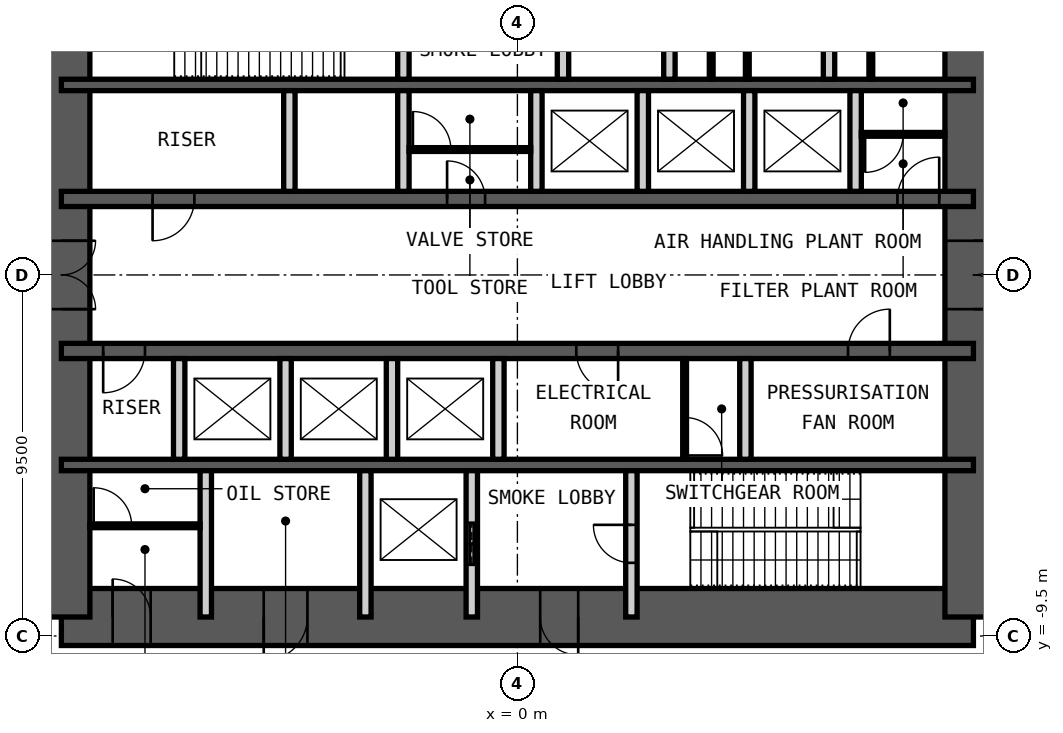
"""IFC4 building model, lengths in metres.
Left out: names, types, materials, properties, quantities, classifications, styles, units other than length and angle.
Written with IfcOpenShell. Run it as: python <this file> out.ifc"""

import sys

from ifc_helpers import new_model, si_unit, direction, frame, frame_2d, origin, place, context, subcontext, project, spatial, rectangle, extrude, element, fill, save


model = new_model("IFC4")
c1 = context("Model", 3, precision=1e-05, world=origin(), true_north=direction((0.0, 1.0)))
c2 = subcontext(c1, "Body", "Model", "MODEL_VIEW")
j1 = project(units=[si_unit("LENGTHUNIT", "METRE"), si_unit("PLANEANGLEUNIT", "RADIAN")], contexts=[c1])
p1 = place(None, origin())
s1 = spatial("IfcSite", under=j1, at=p1, CompositionType="ELEMENT")
p2 = place(p1, origin())
s2 = spatial("IfcBuilding", under=s1, at=p2, CompositionType="ELEMENT")
p3 = place(p2, frame((0.0, 0.0, 97.0)))
s3 = spatial("IfcBuildingStorey", under=s2, at=p3, CompositionType="ELEMENT", Elevation=97.0)
p4 = place(p3, frame((-12.0, -9.0, 0.0), z_axis=(0.0, 0.0, 1.0), x_axis=(1.0, 0.0, 0.0)))
e1 = element("IfcWall", 1, at=p4, inside=s3, PredefinedType="SHEAR", context=c2, shape_type="SweptSolid", body=[
    extrude(rectangle(XDim=24.0, YDim=1.5, at=frame_2d((12.0, 0.0))), origin(), (0.0, 0.0, 1.0), 6.0),
])
p5 = place(p4, frame((1.35, 0.0, 0.0)))
e2 = element("IfcOpeningElement", 2, at=p5, cuts=e1, PredefinedType="OPENING", context=c2, shape_type="SweptSolid", body=[
    extrude(rectangle(XDim=1.0, YDim=2.1, at=frame_2d((0.5, 1.05))), frame((0.0, 0.76, 0.0), z_axis=(0.0, -1.0, 0.0), x_axis=(1.0, 0.0, 0.0)), (0.0, 0.0, 1.0), 1.52),
])
p6 = place(p4, frame((5.325, 0.0, 0.0)))
e3 = element("IfcOpeningElement", 3, at=p6, cuts=e1, PredefinedType="OPENING", context=c2, shape_type="SweptSolid", body=[
    extrude(rectangle(XDim=1.15, YDim=2.1, at=frame_2d((0.575, 1.05))), frame((0.0, 0.76, 0.0), z_axis=(0.0, -1.0, 0.0), x_axis=(1.0, 0.0, 0.0)), (0.0, 0.0, 1.0), 1.52),
])
p7 = place(p4, frame((12.6, 0.0, 0.0)))
e4 = element("IfcOpeningElement", 4, at=p7, cuts=e1, PredefinedType="OPENING", context=c2, shape_type="SweptSolid", body=[
    extrude(rectangle(XDim=1.0, YDim=2.1, at=frame_2d((0.5, 1.05))), frame((0.0, 0.76, 0.0), z_axis=(0.0, -1.0, 0.0), x_axis=(1.0, 0.0, 0.0)), (0.0, 0.0, 1.0), 1.52),
])
p8 = place(p3, frame((12.0, -9.0, 0.0), z_axis=(0.0, 0.0, 1.0), x_axis=(0.0, 1.0, 0.0)))
e5 = element("IfcWall", 5, at=p8, inside=s3, PredefinedType="SHEAR", context=c2, shape_type="SweptSolid", body=[
    extrude(rectangle(XDim=18.0, YDim=1.5, at=frame_2d((9.0, 0.0))), origin(), (0.0, 0.0, 1.0), 6.0),
])
p9 = place(p8, frame((8.1, 0.0, 0.0)))
e6 = element("IfcOpeningElement", 6, at=p9, cuts=e5, PredefinedType="OPENING", context=c2, shape_type="SweptSolid", body=[
    extrude(rectangle(XDim=1.8, YDim=2.1, at=frame_2d((0.9, 1.05))), frame((0.0, 0.76, 0.0), z_axis=(0.0, -1.0, 0.0), x_axis=(1.0, 0.0, 0.0)), (0.0, 0.0, 1.0), 1.52),
])
p10 = place(p3, frame((-12.0, -9.0, 0.0), z_axis=(0.0, 0.0, 1.0), x_axis=(0.0, 1.0, 0.0)))
e7 = element("IfcWall", 7, at=p10, inside=s3, PredefinedType="SHEAR", context=c2, shape_type="SweptSolid", body=[
    extrude(rectangle(XDim=18.0, YDim=1.5, at=frame_2d((9.0, 0.0))), origin(), (0.0, 0.0, 1.0), 6.0),
])
p11 = place(p10, frame((8.1, 0.0, 0.0)))
e8 = element("IfcOpeningElement", 8, at=p11, cuts=e7, PredefinedType="OPENING", context=c2, shape_type="SweptSolid", body=[
    extrude(rectangle(XDim=1.8, YDim=2.1, at=frame_2d((0.9, 1.05))), frame((0.0, 0.76, 0.0), z_axis=(0.0, -1.0, 0.0), x_axis=(1.0, 0.0, 0.0)), (0.0, 0.0, 1.0), 1.52),
])
p12 = place(p3, frame((-12.0, 5.0, 0.0), z_axis=(0.0, 0.0, 1.0), x_axis=(1.0, 0.0, 0.0)))
e9 = element("IfcWall", 9, at=p12, inside=s3, PredefinedType="SHEAR", context=c2, shape_type="SweptSolid", body=[
    extrude(rectangle(XDim=24.0, YDim=0.3, at=frame_2d((12.0, 0.0))), origin(), (0.0, 0.0, 1.0), 6.0),
])
p13 = place(p3, frame((-12.0, 2.0, 0.0), z_axis=(0.0, 0.0, 1.0), x_axis=(1.0, 0.0, 0.0)))
e10 = element("IfcWall", 10, at=p13, inside=s3, PredefinedType="SHEAR", context=c2, shape_type="SweptSolid", body=[
    extrude(rectangle(XDim=24.0, YDim=0.4, at=frame_2d((12.0, 0.0))), origin(), (0.0, 0.0, 1.0), 6.0),
])
p14 = place(p13, frame((2.4, 0.0, 0.0)))
e11 = element("IfcOpeningElement", 11, at=p14, cuts=e10, PredefinedType="OPENING", context=c2, shape_type="SweptSolid", body=[
    extrude(rectangle(XDim=1.1, YDim=2.1, at=frame_2d((0.55, 1.05))), frame((0.0, 0.21, 0.0), z_axis=(0.0, -1.0, 0.0), x_axis=(1.0, 0.0, 0.0)), (0.0, 0.0, 1.0), 0.42),
])
p15 = place(p13, frame((22.0, 0.0, 0.0)))
e12 = element("IfcOpeningElement", 12, at=p15, cuts=e10, PredefinedType="OPENING", context=c2, shape_type="SweptSolid", body=[
    extrude(rectangle(XDim=1.1, YDim=2.1, at=frame_2d((0.55, 1.05))), frame((0.0, 0.21, 0.0), z_axis=(0.0, -1.0, 0.0), x_axis=(1.0, 0.0, 0.0)), (0.0, 0.0, 1.0), 0.42),
])
p16 = place(p13, frame((10.15, 0.0, 0.0)))
e13 = element("IfcOpeningElement", 13, at=p16, cuts=e10, PredefinedType="OPENING", context=c2, shape_type="SweptSolid", body=[
    extrude(rectangle(XDim=1.0, YDim=2.1, at=frame_2d((0.5, 1.05))), frame((0.0, 0.21, 0.0), z_axis=(0.0, -1.0, 0.0), x_axis=(1.0, 0.0, 0.0)), (0.0, 0.0, 1.0), 0.42),
])
p17 = place(p3, frame((-12.0, -2.0, 0.0), z_axis=(0.0, 0.0, 1.0), x_axis=(1.0, 0.0, 0.0)))
e14 = element("IfcWall", 14, at=p17, inside=s3, PredefinedType="SHEAR", context=c2, shape_type="SweptSolid", body=[
    extrude(rectangle(XDim=24.0, YDim=0.4, at=frame_2d((12.0, 0.0))), origin(), (0.0, 0.0, 1.0), 6.0),
])
p18 = place(p17, frame((1.1, 0.0, 0.0)))
e15 = element("IfcOpeningElement", 15, at=p18, cuts=e14, PredefinedType="OPENING", context=c2, shape_type="SweptSolid", body=[
    extrude(rectangle(XDim=1.1, YDim=2.1, at=frame_2d((0.55, 1.05))), frame((0.0, 0.21, 0.0), z_axis=(0.0, -1.0, 0.0), x_axis=(1.0, 0.0, 0.0)), (0.0, 0.0, 1.0), 0.42),
])
p19 = place(p17, frame((13.55, 0.0, 0.0)))
e16 = element("IfcOpeningElement", 16, at=p19, cuts=e14, PredefinedType="OPENING", context=c2, shape_type="SweptSolid", body=[
    extrude(rectangle(XDim=1.1, YDim=2.1, at=frame_2d((0.55, 1.05))), frame((0.0, 0.21, 0.0), z_axis=(0.0, -1.0, 0.0), x_axis=(1.0, 0.0, 0.0)), (0.0, 0.0, 1.0), 0.42),
])
p20 = place(p17, frame((20.7, 0.0, 0.0)))
e17 = element("IfcOpeningElement", 17, at=p20, cuts=e14, PredefinedType="OPENING", context=c2, shape_type="SweptSolid", body=[
    extrude(rectangle(XDim=1.1, YDim=2.1, at=frame_2d((0.55, 1.05))), frame((0.0, 0.21, 0.0), z_axis=(0.0, -1.0, 0.0), x_axis=(1.0, 0.0, 0.0)), (0.0, 0.0, 1.0), 0.42),
])
p21 = place(p3, frame((-12.0, -5.0, 0.0), z_axis=(0.0, 0.0, 1.0), x_axis=(1.0, 0.0, 0.0)))
e18 = element("IfcWall", 18, at=p21, inside=s3, PredefinedType="SHEAR", context=c2, shape_type="SweptSolid", body=[
    extrude(rectangle(XDim=24.0, YDim=0.3, at=frame_2d((12.0, 0.0))), origin(), (0.0, 0.0, 1.0), 6.0),
])
p22 = place(p3, frame((-3.0, 5.15, 0.0), z_axis=(0.0, 0.0, 1.0), x_axis=(0.0, 1.0, 0.0)))
e19 = element("IfcWall", 19, at=p22, inside=s3, PredefinedType="PARTITIONING", context=c2, shape_type="SweptSolid", body=[
    extrude(rectangle(XDim=3.85, YDim=0.3, at=frame_2d((1.925, 0.0))), origin(), (0.0, 0.0, 1.0), 5.78),
])
p23 = place(p22, frame((1.425, 0.0, 0.0)))
e20 = element("IfcOpeningElement", 20, at=p23, cuts=e19, PredefinedType="OPENING", context=c2, shape_type="SweptSolid", body=[
    extrude(rectangle(XDim=1.0, YDim=2.1, at=frame_2d((0.5, 1.05))), frame((0.0, 0.16, 0.0), z_axis=(0.0, -1.0, 0.0), x_axis=(1.0, 0.0, 0.0)), (0.0, 0.0, 1.0), 0.32),
])
p24 = place(p3, frame((1.2, 5.15, 0.0), z_axis=(0.0, 0.0, 1.0), x_axis=(0.0, 1.0, 0.0)))
e21 = element("IfcWall", 21, at=p24, inside=s3, PredefinedType="PARTITIONING", context=c2, shape_type="SweptSolid", body=[
    extrude(rectangle(XDim=3.85, YDim=0.3, at=frame_2d((1.925, 0.0))), origin(), (0.0, 0.0, 1.0), 5.78),
])
p25 = place(p24, frame((1.375, 0.0, 0.0)))
e22 = element("IfcOpeningElement", 22, at=p25, cuts=e21, PredefinedType="OPENING", context=c2, shape_type="SweptSolid", body=[
    extrude(rectangle(XDim=1.1, YDim=2.4, at=frame_2d((0.55, 1.2))), frame((0.0, 0.16, 0.0), z_axis=(0.0, -1.0, 0.0), x_axis=(1.0, 0.0, 0.0)), (0.0, 0.0, 1.0), 0.32),
])
for number, where, z_axis, x_axis in (
    (23, (4.0, 5.15, 0.0), (0.0, 0.0, 1.0), (0.0, 1.0, 0.0)),
    (24, (8.2, 5.15, 0.0), (0.0, 0.0, 1.0), (0.0, 1.0, 0.0)),
):
    element("IfcWall", number, at=place(p3, frame(where, z_axis=z_axis, x_axis=x_axis)), inside=s3, PredefinedType="PARTITIONING", context=c2, shape_type="SweptSolid", body=[
        extrude(rectangle(XDim=3.85, YDim=0.3, at=frame_2d((1.925, 0.0))), origin(), (0.0, 0.0, 1.0), 5.78),
    ])
for number, where, z_axis, x_axis in (
    (25, (-6.0, 2.2, 0.0), (0.0, 0.0, 1.0), (0.0, 1.0, 0.0)),
    (26, (-3.0, 2.2, 0.0), (0.0, 0.0, 1.0), (0.0, 1.0, 0.0)),
    (27, (0.5, 2.2, 0.0), (0.0, 0.0, 1.0), (0.0, 1.0, 0.0)),
    (28, (3.3, 2.2, 0.0), (0.0, 0.0, 1.0), (0.0, 1.0, 0.0)),
    (29, (6.1, 2.2, 0.0), (0.0, 0.0, 1.0), (0.0, 1.0, 0.0)),
    (30, (8.9, 2.2, 0.0), (0.0, 0.0, 1.0), (0.0, 1.0, 0.0)),
    (31, (-8.9, -4.85, 0.0), (0.0, 0.0, 1.0), (0.0, 1.0, 0.0)),
    (32, (-6.1, -4.85, 0.0), (0.0, 0.0, 1.0), (0.0, 1.0, 0.0)),
    (33, (-3.3, -4.85, 0.0), (0.0, 0.0, 1.0), (0.0, 1.0, 0.0)),
    (34, (-0.5, -4.85, 0.0), (0.0, 0.0, 1.0), (0.0, 1.0, 0.0)),
    (35, (6.0, -4.85, 0.0), (0.0, 0.0, 1.0), (0.0, 1.0, 0.0)),
):
    element("IfcWall", number, at=place(p3, frame(where, z_axis=z_axis, x_axis=x_axis)), inside=s3, PredefinedType="PARTITIONING", context=c2, shape_type="SweptSolid", body=[
        extrude(rectangle(XDim=2.65, YDim=0.3, at=frame_2d((1.325, 0.0))), origin(), (0.0, 0.0, 1.0), 5.78),
    ])
for number, where, z_axis, x_axis in (
    (36, (-8.2, -9.0, 0.0), (0.0, 0.0, 1.0), (0.0, 1.0, 0.0)),
    (37, (-4.0, -9.0, 0.0), (0.0, 0.0, 1.0), (0.0, 1.0, 0.0)),
):
    element("IfcWall", number, at=place(p3, frame(where, z_axis=z_axis, x_axis=x_axis)), inside=s3, PredefinedType="PARTITIONING", context=c2, shape_type="SweptSolid", body=[
        extrude(rectangle(XDim=3.85, YDim=0.3, at=frame_2d((1.925, 0.0))), origin(), (0.0, 0.0, 1.0), 5.78),
    ])
p26 = place(p3, frame((-1.2, -9.0, 0.0), z_axis=(0.0, 0.0, 1.0), x_axis=(0.0, 1.0, 0.0)))
e38 = element("IfcWall", 38, at=p26, inside=s3, PredefinedType="PARTITIONING", context=c2, shape_type="SweptSolid", body=[
    extrude(rectangle(XDim=3.85, YDim=0.3, at=frame_2d((1.925, 0.0))), origin(), (0.0, 0.0, 1.0), 5.78),
])
p27 = place(p26, frame((1.375, 0.0, 0.0)))
e39 = element("IfcOpeningElement", 39, at=p27, cuts=e38, PredefinedType="OPENING", context=c2, shape_type="SweptSolid", body=[
    extrude(rectangle(XDim=1.1, YDim=2.4, at=frame_2d((0.55, 1.2))), frame((0.0, 0.16, 0.0), z_axis=(0.0, -1.0, 0.0), x_axis=(1.0, 0.0, 0.0)), (0.0, 0.0, 1.0), 0.32),
])
p28 = place(p3, frame((3.0, -9.0, 0.0), z_axis=(0.0, 0.0, 1.0), x_axis=(0.0, 1.0, 0.0)))
e40 = element("IfcWall", 40, at=p28, inside=s3, PredefinedType="PARTITIONING", context=c2, shape_type="SweptSolid", body=[
    extrude(rectangle(XDim=3.85, YDim=0.3, at=frame_2d((1.925, 0.0))), origin(), (0.0, 0.0, 1.0), 5.78),
])
p29 = place(p28, frame((1.425, 0.0, 0.0)))
e41 = element("IfcOpeningElement", 41, at=p29, cuts=e40, PredefinedType="OPENING", context=c2, shape_type="SweptSolid", body=[
    extrude(rectangle(XDim=1.0, YDim=2.1, at=frame_2d((0.5, 1.05))), frame((0.0, 0.16, 0.0), z_axis=(0.0, -1.0, 0.0), x_axis=(1.0, 0.0, 0.0)), (0.0, 0.0, 1.0), 0.32),
])
p30 = place(p3, frame((-2.85, 3.3, 0.0), z_axis=(0.0, 0.0, 1.0), x_axis=(1.0, 0.0, 0.0)))
e42 = element("IfcWall", 42, at=p30, inside=s3, PredefinedType="PARTITIONING", context=c2, shape_type="SweptSolid", body=[
    extrude(rectangle(XDim=3.2, YDim=0.1, at=frame_2d((1.6, 0.0))), origin(), (0.0, 0.0, 1.0), 5.78),
])
p31 = place(p30, frame((0.1, 0.0, 0.0)))
e43 = element("IfcOpeningElement", 43, at=p31, cuts=e42, PredefinedType="OPENING", context=c2, shape_type="SweptSolid", body=[
    extrude(rectangle(XDim=1.0, YDim=2.4, at=frame_2d((0.5, 1.2))), frame((0.0, 0.06, 0.0), z_axis=(0.0, -1.0, 0.0), x_axis=(1.0, 0.0, 0.0)), (0.0, 0.0, 1.0), 0.12),
])
p32 = place(p3, frame((4.4, -4.85, 0.0), z_axis=(0.0, 0.0, 1.0), x_axis=(0.0, 1.0, 0.0)))
e44 = element("IfcWall", 44, at=p32, inside=s3, PredefinedType="PARTITIONING", context=c2, shape_type="SweptSolid", body=[
    extrude(rectangle(XDim=2.65, YDim=0.1, at=frame_2d((1.325, 0.0))), origin(), (0.0, 0.0, 1.0), 5.78),
])
p33 = place(p32, frame((0.1, 0.0, 0.0)))
e45 = element("IfcOpeningElement", 45, at=p33, cuts=e44, PredefinedType="OPENING", context=c2, shape_type="SweptSolid", body=[
    extrude(rectangle(XDim=1.0, YDim=2.4, at=frame_2d((0.5, 1.2))), frame((0.0, 0.06, 0.0), z_axis=(0.0, -1.0, 0.0), x_axis=(1.0, 0.0, 0.0)), (0.0, 0.0, 1.0), 0.12),
])
p34 = place(p3, frame((-11.25, -6.6, 0.0), z_axis=(0.0, 0.0, 1.0), x_axis=(1.0, 0.0, 0.0)))
e46 = element("IfcWall", 46, at=p34, inside=s3, PredefinedType="PARTITIONING", context=c2, shape_type="SweptSolid", body=[
    extrude(rectangle(XDim=2.9, YDim=0.1, at=frame_2d((1.45, 0.0))), origin(), (0.0, 0.0, 1.0), 5.78),
])
p35 = place(p34, frame((0.1, 0.0, 0.0)))
e47 = element("IfcOpeningElement", 47, at=p35, cuts=e46, PredefinedType="OPENING", context=c2, shape_type="SweptSolid", body=[
    extrude(rectangle(XDim=1.0, YDim=2.4, at=frame_2d((0.5, 1.2))), frame((0.0, 0.06, 0.0), z_axis=(0.0, -1.0, 0.0), x_axis=(1.0, 0.0, 0.0)), (0.0, 0.0, 1.0), 0.12),
])
p36 = place(p3, frame((9.05, 3.7, 0.0), z_axis=(0.0, 0.0, 1.0), x_axis=(1.0, 0.0, 0.0)))
e48 = element("IfcWall", 48, at=p36, inside=s3, PredefinedType="PARTITIONING", context=c2, shape_type="SweptSolid", body=[
    extrude(rectangle(XDim=2.2, YDim=0.1, at=frame_2d((1.1, 0.0))), origin(), (0.0, 0.0, 1.0), 5.78),
])
p37 = place(p36, frame((0.1, 0.0, 0.0)))
e49 = element("IfcOpeningElement", 49, at=p37, cuts=e48, PredefinedType="OPENING", context=c2, shape_type="SweptSolid", body=[
    extrude(rectangle(XDim=1.0, YDim=2.4, at=frame_2d((0.5, 1.2))), frame((0.0, 0.06, 0.0), z_axis=(0.0, -1.0, 0.0), x_axis=(1.0, 0.0, 0.0)), (0.0, 0.0, 1.0), 0.12),
])
for number, where, z_axis, x_axis in (
    (50, (5.1, 5.15, 0.0), (0.0, 0.0, 1.0), (0.0, 1.0, 0.0)),
    (51, (6.05, 5.15, 0.0), (0.0, 0.0, 1.0), (0.0, 1.0, 0.0)),
    (52, (9.3, 5.15, 0.0), (0.0, 0.0, 1.0), (0.0, 1.0, 0.0)),
):
    element("IfcWall", number, at=place(p3, frame(where, z_axis=z_axis, x_axis=x_axis)), inside=s3, PredefinedType="PARTITIONING", context=c2, shape_type="SweptSolid", body=[
        extrude(rectangle(XDim=1.5, YDim=0.1, at=frame_2d((0.75, 0.0))), origin(), (0.0, 0.0, 1.0), 2.1),
    ])
p38 = place(p5, origin())
e53 = element("IfcDoor", 53, at=p38, inside=s3, OperationType="SINGLE_SWING_RIGHT", PredefinedType="DOOR", context=c2, shape_type="SweptSolid", body=[
    extrude(rectangle(XDim=1.0, YDim=2.1, at=frame_2d((0.5, 1.05))), frame((0.0, 0.025, 0.0), z_axis=(0.0, -1.0, 0.0), x_axis=(1.0, 0.0, 0.0)), (0.0, 0.0, 1.0), 0.05),
])
fill(e2, e53)
p39 = place(p6, origin())
e54 = element("IfcDoor", 54, at=p39, inside=s3, OperationType="SINGLE_SWING_LEFT", PredefinedType="DOOR", context=c2, shape_type="SweptSolid", body=[
    extrude(rectangle(XDim=1.15, YDim=2.1, at=frame_2d((0.575, 1.05))), frame((0.0, 0.025, 0.0), z_axis=(0.0, -1.0, 0.0), x_axis=(1.0, 0.0, 0.0)), (0.0, 0.0, 1.0), 0.05),
])
fill(e3, e54)
p40 = place(p7, origin())
e55 = element("IfcDoor", 55, at=p40, inside=s3, OperationType="SINGLE_SWING_RIGHT", PredefinedType="DOOR", context=c2, shape_type="SweptSolid", body=[
    extrude(rectangle(XDim=1.0, YDim=2.1, at=frame_2d((0.5, 1.05))), frame((0.0, 0.025, 0.0), z_axis=(0.0, -1.0, 0.0), x_axis=(1.0, 0.0, 0.0)), (0.0, 0.0, 1.0), 0.05),
])
fill(e4, e55)
p41 = place(p29, origin())
e56 = element("IfcDoor", 56, at=p41, inside=s3, OperationType="SINGLE_SWING_LEFT", PredefinedType="DOOR", context=c2, shape_type="SweptSolid", body=[
    extrude(rectangle(XDim=1.0, YDim=2.1, at=frame_2d((0.5, 1.05))), frame((0.0, 0.025, 0.0), z_axis=(0.0, -1.0, 0.0), x_axis=(1.0, 0.0, 0.0)), (0.0, 0.0, 1.0), 0.05),
])
fill(e41, e56)
p42 = place(p14, origin())
e57 = element("IfcDoor", 57, at=p42, inside=s3, OperationType="SINGLE_SWING_LEFT", PredefinedType="DOOR", context=c2, shape_type="SweptSolid", body=[
    extrude(rectangle(XDim=1.1, YDim=2.1, at=frame_2d((0.55, 1.05))), frame((0.0, 0.025, 0.0), z_axis=(0.0, -1.0, 0.0), x_axis=(1.0, 0.0, 0.0)), (0.0, 0.0, 1.0), 0.05),
])
fill(e11, e57)
p43 = place(p18, origin())
e58 = element("IfcDoor", 58, at=p43, inside=s3, OperationType="SINGLE_SWING_LEFT", PredefinedType="DOOR", context=c2, shape_type="SweptSolid", body=[
    extrude(rectangle(XDim=1.1, YDim=2.1, at=frame_2d((0.55, 1.05))), frame((0.0, 0.025, 0.0), z_axis=(0.0, -1.0, 0.0), x_axis=(1.0, 0.0, 0.0)), (0.0, 0.0, 1.0), 0.05),
])
fill(e15, e58)
p44 = place(p15, origin())
e59 = element("IfcDoor", 59, at=p44, inside=s3, OperationType="SINGLE_SWING_LEFT", PredefinedType="DOOR", context=c2, shape_type="SweptSolid", body=[
    extrude(rectangle(XDim=1.1, YDim=2.1, at=frame_2d((0.55, 1.05))), frame((0.0, 0.025, 0.0), z_axis=(0.0, -1.0, 0.0), x_axis=(1.0, 0.0, 0.0)), (0.0, 0.0, 1.0), 0.05),
])
fill(e12, e59)
p45 = place(p16, origin())
e60 = element("IfcDoor", 60, at=p45, inside=s3, OperationType="SINGLE_SWING_RIGHT", PredefinedType="DOOR", context=c2, shape_type="SweptSolid", body=[
    extrude(rectangle(XDim=1.0, YDim=2.1, at=frame_2d((0.5, 1.05))), frame((0.0, 0.025, 0.0), z_axis=(0.0, -1.0, 0.0), x_axis=(1.0, 0.0, 0.0)), (0.0, 0.0, 1.0), 0.05),
])
fill(e13, e60)
p46 = place(p19, origin())
e61 = element("IfcDoor", 61, at=p46, inside=s3, OperationType="SINGLE_SWING_RIGHT", PredefinedType="DOOR", context=c2, shape_type="SweptSolid", body=[
    extrude(rectangle(XDim=1.1, YDim=2.1, at=frame_2d((0.55, 1.05))), frame((0.0, 0.025, 0.0), z_axis=(0.0, -1.0, 0.0), x_axis=(1.0, 0.0, 0.0)), (0.0, 0.0, 1.0), 0.05),
])
fill(e16, e61)
p47 = place(p20, origin())
e62 = element("IfcDoor", 62, at=p47, inside=s3, OperationType="SINGLE_SWING_LEFT", PredefinedType="DOOR", context=c2, shape_type="SweptSolid", body=[
    extrude(rectangle(XDim=1.1, YDim=2.1, at=frame_2d((0.55, 1.05))), frame((0.0, 0.025, 0.0), z_axis=(0.0, -1.0, 0.0), x_axis=(1.0, 0.0, 0.0)), (0.0, 0.0, 1.0), 0.05),
])
fill(e17, e62)
p48 = place(p9, origin())
e63 = element("IfcDoor", 63, at=p48, inside=s3, OperationType="DOUBLE_DOOR_DOUBLE_SWING", PredefinedType="DOOR", context=c2, shape_type="SweptSolid", body=[
    extrude(rectangle(XDim=1.8, YDim=2.1, at=frame_2d((0.9, 1.05))), frame((0.0, 0.025, 0.0), z_axis=(0.0, -1.0, 0.0), x_axis=(1.0, 0.0, 0.0)), (0.0, 0.0, 1.0), 0.05),
])
fill(e6, e63)
p49 = place(p11, origin())
e64 = element("IfcDoor", 64, at=p49, inside=s3, OperationType="DOUBLE_DOOR_DOUBLE_SWING", PredefinedType="DOOR", context=c2, shape_type="SweptSolid", body=[
    extrude(rectangle(XDim=1.8, YDim=2.1, at=frame_2d((0.9, 1.05))), frame((0.0, 0.025, 0.0), z_axis=(0.0, -1.0, 0.0), x_axis=(1.0, 0.0, 0.0)), (0.0, 0.0, 1.0), 0.05),
])
fill(e8, e64)
p50 = place(p27, origin())
e65 = element("IfcDoor", 65, at=p50, inside=s3, OperationType="DOUBLE_DOOR_SLIDING", PredefinedType="DOOR", context=c2, shape_type="SweptSolid", body=[
    extrude(rectangle(XDim=1.1, YDim=2.4, at=frame_2d((0.55, 1.2))), frame((0.0, 0.025, 0.0), z_axis=(0.0, -1.0, 0.0), x_axis=(1.0, 0.0, 0.0)), (0.0, 0.0, 1.0), 0.05),
])
fill(e39, e65)
p51 = place(p31, origin())
e66 = element("IfcDoor", 66, at=p51, inside=s3, OperationType="SINGLE_SWING_RIGHT", PredefinedType="DOOR", context=c2, shape_type="SweptSolid", body=[
    extrude(rectangle(XDim=1.0, YDim=2.4, at=frame_2d((0.5, 1.2))), frame((0.0, 0.025, 0.0), z_axis=(0.0, -1.0, 0.0), x_axis=(1.0, 0.0, 0.0)), (0.0, 0.0, 1.0), 0.05),
])
fill(e43, e66)
p52 = place(p33, origin())
e67 = element("IfcDoor", 67, at=p52, inside=s3, OperationType="SINGLE_SWING_LEFT", PredefinedType="DOOR", context=c2, shape_type="SweptSolid", body=[
    extrude(rectangle(XDim=1.0, YDim=2.4, at=frame_2d((0.5, 1.2))), frame((0.0, 0.025, 0.0), z_axis=(0.0, -1.0, 0.0), x_axis=(1.0, 0.0, 0.0)), (0.0, 0.0, 1.0), 0.05),
])
fill(e45, e67)
p53 = place(p35, origin())
e68 = element("IfcDoor", 68, at=p53, inside=s3, OperationType="SINGLE_SWING_RIGHT", PredefinedType="DOOR", context=c2, shape_type="SweptSolid", body=[
    extrude(rectangle(XDim=1.0, YDim=2.4, at=frame_2d((0.5, 1.2))), frame((0.0, 0.025, 0.0), z_axis=(0.0, -1.0, 0.0), x_axis=(1.0, 0.0, 0.0)), (0.0, 0.0, 1.0), 0.05),
])
fill(e47, e68)
p54 = place(p37, origin())
e69 = element("IfcDoor", 69, at=p54, inside=s3, OperationType="SINGLE_SWING_LEFT", PredefinedType="DOOR", context=c2, shape_type="SweptSolid", body=[
    extrude(rectangle(XDim=1.0, YDim=2.4, at=frame_2d((0.5, 1.2))), frame((0.0, 0.025, 0.0), z_axis=(0.0, -1.0, 0.0), x_axis=(1.0, 0.0, 0.0)), (0.0, 0.0, 1.0), 0.05),
])
fill(e49, e69)
save(model, sys.argv[1])
